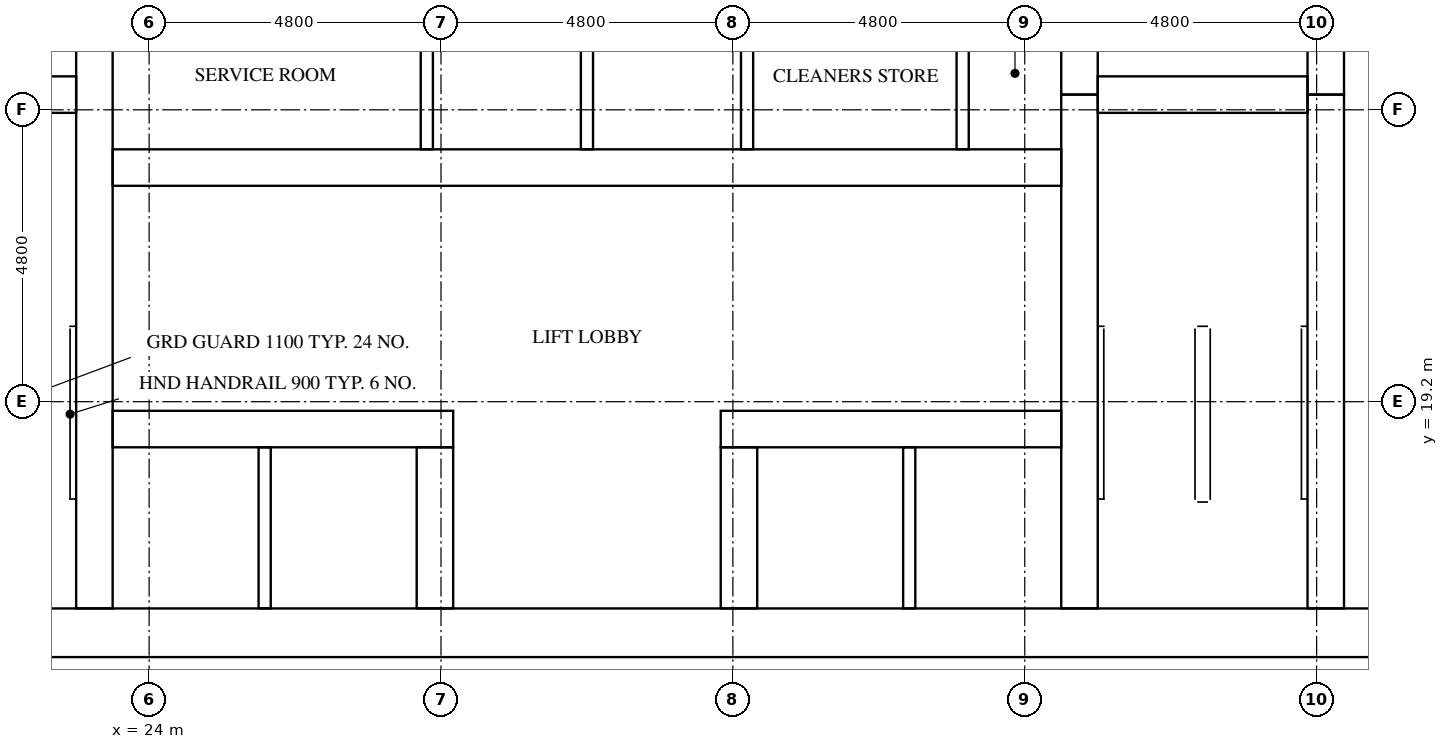
"""IFC4 building model, lengths in metres.
Left out: names, types, materials, properties, quantities, classifications, styles, units other than length and angle.
Written with IfcOpenShell. Run it as: python <this file> out.ifc"""

import sys

from ifc_helpers import new_model, si_unit, direction, frame, frame_2d, origin, place, context, subcontext, project, spatial, rectangle, extrude, element, fill, save


model = new_model("IFC4")
c1 = context("Model", 3, precision=1e-05, world=origin(), true_north=direction((0.0, 1.0)))
c2 = subcontext(c1, "Body", "Model", "MODEL_VIEW")
j1 = project(units=[si_unit("LENGTHUNIT", "METRE"), si_unit("PLANEANGLEUNIT", "RADIAN")], contexts=[c1])
p1 = place(None, origin())
s1 = spatial("IfcSite", under=j1, at=p1, CompositionType="ELEMENT")
p2 = place(p1, origin())
s2 = spatial("IfcBuilding", under=s1, at=p2, CompositionType="ELEMENT")
p3 = place(p2, frame((0.0, 0.0, 136.6)))
s3 = spatial("IfcBuildingStorey", under=s2, at=p3, CompositionType="ELEMENT", Elevation=136.6)
p4 = place(p3, frame((15.0, 15.4, 0.0), z_axis=(0.0, 0.0, 1.0), x_axis=(1.0, 0.0, 0.0)))
e1 = element("IfcWall", 1, at=p4, inside=s3, PredefinedType="SHEAR", context=c2, shape_type="SweptSolid", body=[
    extrude(rectangle(XDim=32.4, YDim=0.8, at=frame_2d((16.2, 0.0))), origin(), (0.0, 0.0, 1.0), 3.2),
])
p5 = place(p4, frame((15.3, 0.0, 0.0)))
e2 = element("IfcOpeningElement", 2, at=p5, cuts=e1, PredefinedType="OPENING", context=c2, shape_type="SweptSolid", body=[
    extrude(rectangle(XDim=1.8, YDim=2.1, at=frame_2d((0.9, 1.05))), frame((0.0, 0.41, 0.0), z_axis=(0.0, -1.0, 0.0), x_axis=(1.0, 0.0, 0.0)), (0.0, 0.0, 1.0), 0.82),
])
p6 = place(p3, frame((23.1, 15.8, 0.0), z_axis=(0.0, 0.0, 1.0), x_axis=(0.0, 1.0, 0.0)))
e3 = element("IfcWall", 3, at=p6, inside=s3, PredefinedType="SHEAR", context=c2, shape_type="SweptSolid", body=[
    extrude(rectangle(XDim=21.2, YDim=0.6, at=frame_2d((10.6, 0.0))), origin(), (0.0, 0.0, 1.0), 3.2),
])
p7 = place(p3, frame((39.3, 15.8, 0.0), z_axis=(0.0, 0.0, 1.0), x_axis=(0.0, 1.0, 0.0)))
e4 = element("IfcWall", 4, at=p7, inside=s3, PredefinedType="SHEAR", context=c2, shape_type="SweptSolid", body=[
    extrude(rectangle(XDim=8.45, YDim=0.6, at=frame_2d((4.225, 0.0))), origin(), (0.0, 0.0, 1.0), 3.2),
])
p8 = place(p3, frame((39.3, 24.25, 0.0), z_axis=(0.0, 0.0, 1.0), x_axis=(0.0, 1.0, 0.0)))
e5 = element("IfcWall", 5, at=p8, inside=s3, PredefinedType="SHEAR", context=c2, shape_type="SweptSolid", body=[
    extrude(rectangle(XDim=3.5, YDim=0.6, at=frame_2d((1.75, 0.0))), origin(), (0.0, 0.0, 1.0), 3.2),
])
p9 = place(p3, frame((43.35, 15.8, 0.0), z_axis=(0.0, 0.0, 1.0), x_axis=(0.0, 1.0, 0.0)))
e6 = element("IfcWall", 6, at=p9, inside=s3, PredefinedType="SHEAR", context=c2, shape_type="SweptSolid", body=[
    extrude(rectangle(XDim=8.45, YDim=0.6, at=frame_2d((4.225, 0.0))), origin(), (0.0, 0.0, 1.0), 3.2),
])
p10 = place(p9, frame((0.4, 0.0, 0.0)))
e7 = element("IfcOpeningElement", 7, at=p10, cuts=e6, PredefinedType="OPENING", context=c2, shape_type="SweptSolid", body=[
    extrude(rectangle(XDim=1.2, YDim=2.1, at=frame_2d((0.6, 1.05))), frame((0.0, 0.31, 0.0), z_axis=(0.0, -1.0, 0.0), x_axis=(1.0, 0.0, 0.0)), (0.0, 0.0, 1.0), 0.62),
])
p11 = place(p3, frame((43.35, 24.25, 0.0), z_axis=(0.0, 0.0, 1.0), x_axis=(0.0, 1.0, 0.0)))
e8 = element("IfcWall", 8, at=p11, inside=s3, PredefinedType="SHEAR", context=c2, shape_type="SweptSolid", body=[
    extrude(rectangle(XDim=3.5, YDim=0.6, at=frame_2d((1.75, 0.0))), origin(), (0.0, 0.0, 1.0), 3.2),
])
p12 = place(p11, frame((1.2, 0.0, 0.0)))
e9 = element("IfcOpeningElement", 9, at=p12, cuts=e8, PredefinedType="OPENING", context=c2, shape_type="SweptSolid", body=[
    extrude(rectangle(XDim=1.1, YDim=2.1, at=frame_2d((0.55, 1.05))), frame((0.0, 0.31, 0.0), z_axis=(0.0, -1.0, 0.0), x_axis=(1.0, 0.0, 0.0)), (0.0, 0.0, 1.0), 0.62),
])
for number, where, z_axis, x_axis in (
    (10, (19.35, 24.25, 0.0), (0.0, 0.0, 1.0), (1.0, 0.0, 0.0)),
    (11, (39.6, 24.25, 0.0), (0.0, 0.0, 1.0), (1.0, 0.0, 0.0)),
):
    element("IfcWall", number, at=place(p3, frame(where, z_axis=z_axis, x_axis=x_axis)), inside=s3, PredefinedType="SHEAR", context=c2, shape_type="SweptSolid", body=[
        extrude(rectangle(XDim=3.45, YDim=0.6, at=frame_2d((1.725, 0.0))), origin(), (0.0, 0.0, 1.0), 3.2),
    ])
p13 = place(p3, frame((23.4, 18.75, 0.0), z_axis=(0.0, 0.0, 1.0), x_axis=(1.0, 0.0, 0.0)))
e12 = element("IfcWall", 12, at=p13, inside=s3, PredefinedType="SHEAR", context=c2, shape_type="SweptSolid", body=[
    extrude(rectangle(XDim=5.6, YDim=0.6, at=frame_2d((2.8, 0.0))), origin(), (0.0, 0.0, 1.0), 3.2),
])
p14 = place(p13, frame((0.65, 0.0, 0.0)))
e13 = element("IfcOpeningElement", 13, at=p14, cuts=e12, PredefinedType="OPENING", context=c2, shape_type="SweptSolid", body=[
    extrude(rectangle(XDim=1.1, YDim=2.1, at=frame_2d((0.55, 1.05))), frame((0.0, 0.31, 0.0), z_axis=(0.0, -1.0, 0.0), x_axis=(1.0, 0.0, 0.0)), (0.0, 0.0, 1.0), 0.62),
])
p15 = place(p13, frame((3.25, 0.0, 0.0)))
e14 = element("IfcOpeningElement", 14, at=p15, cuts=e12, PredefinedType="OPENING", context=c2, shape_type="SweptSolid", body=[
    extrude(rectangle(XDim=1.1, YDim=2.1, at=frame_2d((0.55, 1.05))), frame((0.0, 0.31, 0.0), z_axis=(0.0, -1.0, 0.0), x_axis=(1.0, 0.0, 0.0)), (0.0, 0.0, 1.0), 0.62),
])
p16 = place(p3, frame((33.4, 18.75, 0.0), z_axis=(0.0, 0.0, 1.0), x_axis=(1.0, 0.0, 0.0)))
e15 = element("IfcWall", 15, at=p16, inside=s3, PredefinedType="SHEAR", context=c2, shape_type="SweptSolid", body=[
    extrude(rectangle(XDim=5.6, YDim=0.6, at=frame_2d((2.8, 0.0))), origin(), (0.0, 0.0, 1.0), 3.2),
])
p17 = place(p16, frame((1.25, 0.0, 0.0)))
e16 = element("IfcOpeningElement", 16, at=p17, cuts=e15, PredefinedType="OPENING", context=c2, shape_type="SweptSolid", body=[
    extrude(rectangle(XDim=1.1, YDim=2.1, at=frame_2d((0.55, 1.05))), frame((0.0, 0.31, 0.0), z_axis=(0.0, -1.0, 0.0), x_axis=(1.0, 0.0, 0.0)), (0.0, 0.0, 1.0), 0.62),
])
p18 = place(p16, frame((3.85, 0.0, 0.0)))
e17 = element("IfcOpeningElement", 17, at=p18, cuts=e15, PredefinedType="OPENING", context=c2, shape_type="SweptSolid", body=[
    extrude(rectangle(XDim=1.1, YDim=2.1, at=frame_2d((0.55, 1.05))), frame((0.0, 0.31, 0.0), z_axis=(0.0, -1.0, 0.0), x_axis=(1.0, 0.0, 0.0)), (0.0, 0.0, 1.0), 0.62),
])
p19 = place(p3, frame((23.4, 23.05, 0.0), z_axis=(0.0, 0.0, 1.0), x_axis=(1.0, 0.0, 0.0)))
e18 = element("IfcWall", 18, at=p19, inside=s3, PredefinedType="SHEAR", context=c2, shape_type="SweptSolid", body=[
    extrude(rectangle(XDim=15.6, YDim=0.6, at=frame_2d((7.8, 0.0))), origin(), (0.0, 0.0, 1.0), 3.2),
])
p20 = place(p19, frame((2.033, 0.0, 0.0)))
e19 = element("IfcOpeningElement", 19, at=p20, cuts=e18, PredefinedType="OPENING", context=c2, shape_type="SweptSolid", body=[
    extrude(rectangle(XDim=1.0, YDim=2.1, at=frame_2d((0.5, 1.05))), frame((0.0, 0.31, 0.0), z_axis=(0.0, -1.0, 0.0), x_axis=(1.0, 0.0, 0.0)), (0.0, 0.0, 1.0), 0.62),
])
p21 = place(p19, frame((11.706, 0.0, 0.0)))
e20 = element("IfcOpeningElement", 20, at=p21, cuts=e18, PredefinedType="OPENING", context=c2, shape_type="SweptSolid", body=[
    extrude(rectangle(XDim=1.0, YDim=2.1, at=frame_2d((0.5, 1.05))), frame((0.0, 0.31, 0.0), z_axis=(0.0, -1.0, 0.0), x_axis=(1.0, 0.0, 0.0)), (0.0, 0.0, 1.0), 0.62),
])
p22 = place(p19, frame((14.339, 0.0, 0.0)))
e21 = element("IfcOpeningElement", 21, at=p22, cuts=e18, PredefinedType="OPENING", context=c2, shape_type="SweptSolid", body=[
    extrude(rectangle(XDim=1.0, YDim=2.1, at=frame_2d((0.5, 1.05))), frame((0.0, 0.31, 0.0), z_axis=(0.0, -1.0, 0.0), x_axis=(1.0, 0.0, 0.0)), (0.0, 0.0, 1.0), 0.62),
])
for number, where, z_axis, x_axis in (
    (22, (28.7, 15.8, 0.0), (0.0, 0.0, 1.0), (0.0, 1.0, 0.0)),
    (23, (33.7, 15.8, 0.0), (0.0, 0.0, 1.0), (0.0, 1.0, 0.0)),
):
    element("IfcWall", number, at=place(p3, frame(where, z_axis=z_axis, x_axis=x_axis)), inside=s3, PredefinedType="SHEAR", context=c2, shape_type="SweptSolid", body=[
        extrude(rectangle(XDim=2.65, YDim=0.6, at=frame_2d((1.325, 0.0))), origin(), (0.0, 0.0, 1.0), 3.2),
    ])
for number, where, z_axis, x_axis in (
    (24, (28.567, 23.35, 0.0), (0.0, 0.0, 1.0), (0.0, 1.0, 0.0)),
    (25, (31.2, 23.35, 0.0), (0.0, 0.0, 1.0), (0.0, 1.0, 0.0)),
    (26, (33.833, 23.35, 0.0), (0.0, 0.0, 1.0), (0.0, 1.0, 0.0)),
):
    element("IfcWall", number, at=place(p3, frame(where, z_axis=z_axis, x_axis=x_axis)), inside=s3, PredefinedType="SOLIDWALL", context=c2, shape_type="SweptSolid", body=[
        extrude(rectangle(XDim=2.5, YDim=0.2, at=frame_2d((1.25, 0.0))), origin(), (0.0, 0.0, 1.0), 3.2),
    ])
for number, where, z_axis, x_axis in (
    (27, (25.9, 15.8, 0.0), (0.0, 0.0, 1.0), (0.0, 1.0, 0.0)),
    (28, (36.5, 15.8, 0.0), (0.0, 0.0, 1.0), (0.0, 1.0, 0.0)),
):
    element("IfcWall", number, at=place(p3, frame(where, z_axis=z_axis, x_axis=x_axis)), inside=s3, PredefinedType="SOLIDWALL", context=c2, shape_type="SweptSolid", body=[
        extrude(rectangle(XDim=2.65, YDim=0.2, at=frame_2d((1.325, 0.0))), origin(), (0.0, 0.0, 1.0), 3.2),
    ])
p23 = place(p3, frame((37.379, 23.35, 0.0), z_axis=(0.0, 0.0, 1.0), x_axis=(0.0, 1.0, 0.0)))
e29 = element("IfcWall", 29, at=p23, inside=s3, PredefinedType="PARTITIONING", context=c2, shape_type="SweptSolid", body=[
    extrude(rectangle(XDim=2.5, YDim=0.2, at=frame_2d((1.25, 0.0))), origin(), (0.0, 0.0, 1.0), 3.2),
])
p24 = place(p14, origin())
e30 = element("IfcDoor", 30, at=p24, inside=s3, OperationType="DOUBLE_DOOR_SLIDING", PredefinedType="DOOR", context=c2, shape_type="SweptSolid", body=[
    extrude(rectangle(XDim=1.1, YDim=2.1, at=frame_2d((0.55, 1.05))), frame((0.0, 0.025, 0.0), z_axis=(0.0, -1.0, 0.0), x_axis=(1.0, 0.0, 0.0)), (0.0, 0.0, 1.0), 0.05),
])
fill(e13, e30)
p25 = place(p15, origin())
e31 = element("IfcDoor", 31, at=p25, inside=s3, OperationType="DOUBLE_DOOR_SLIDING", PredefinedType="DOOR", context=c2, shape_type="SweptSolid", body=[
    extrude(rectangle(XDim=1.1, YDim=2.1, at=frame_2d((0.55, 1.05))), frame((0.0, 0.025, 0.0), z_axis=(0.0, -1.0, 0.0), x_axis=(1.0, 0.0, 0.0)), (0.0, 0.0, 1.0), 0.05),
])
fill(e14, e31)
p26 = place(p17, origin())
e32 = element("IfcDoor", 32, at=p26, inside=s3, OperationType="DOUBLE_DOOR_SLIDING", PredefinedType="DOOR", context=c2, shape_type="SweptSolid", body=[
    extrude(rectangle(XDim=1.1, YDim=2.1, at=frame_2d((0.55, 1.05))), frame((0.0, 0.025, 0.0), z_axis=(0.0, -1.0, 0.0), x_axis=(1.0, 0.0, 0.0)), (0.0, 0.0, 1.0), 0.05),
])
fill(e16, e32)
p27 = place(p18, origin())
e33 = element("IfcDoor", 33, at=p27, inside=s3, OperationType="DOUBLE_DOOR_SLIDING", PredefinedType="DOOR", context=c2, shape_type="SweptSolid", body=[
    extrude(rectangle(XDim=1.1, YDim=2.1, at=frame_2d((0.55, 1.05))), frame((0.0, 0.025, 0.0), z_axis=(0.0, -1.0, 0.0), x_axis=(1.0, 0.0, 0.0)), (0.0, 0.0, 1.0), 0.05),
])
fill(e17, e33)
p28 = place(p10, origin())
e34 = element("IfcDoor", 34, at=p28, inside=s3, OperationType="SINGLE_SWING_RIGHT", PredefinedType="DOOR", context=c2, shape_type="SweptSolid", body=[
    extrude(rectangle(XDim=1.2, YDim=2.1, at=frame_2d((0.6, 1.05))), frame((0.0, 0.025, 0.0), z_axis=(0.0, -1.0, 0.0), x_axis=(1.0, 0.0, 0.0)), (0.0, 0.0, 1.0), 0.05),
])
fill(e7, e34)
p29 = place(p5, frame((1.8, 0.0, 0.0), z_axis=(0.0, 0.0, 1.0), x_axis=(-1.0, 0.0, 0.0)))
e35 = element("IfcDoor", 35, at=p29, inside=s3, OperationType="DOUBLE_DOOR_SINGLE_SWING", PredefinedType="DOOR", context=c2, shape_type="SweptSolid", body=[
    extrude(rectangle(XDim=1.8, YDim=2.1, at=frame_2d((0.9, 1.05))), frame((0.0, 0.025, 0.0), z_axis=(0.0, -1.0, 0.0), x_axis=(1.0, 0.0, 0.0)), (0.0, 0.0, 1.0), 0.05),
])
fill(e2, e35)
p30 = place(p20, frame((1.0, 0.0, 0.0), z_axis=(0.0, 0.0, 1.0), x_axis=(-1.0, 0.0, 0.0)))
e36 = element("IfcDoor", 36, at=p30, inside=s3, OperationType="SINGLE_SWING_RIGHT", PredefinedType="DOOR", context=c2, shape_type="SweptSolid", body=[
    extrude(rectangle(XDim=1.0, YDim=2.1, at=frame_2d((0.5, 1.05))), frame((0.0, 0.025, 0.0), z_axis=(0.0, -1.0, 0.0), x_axis=(1.0, 0.0, 0.0)), (0.0, 0.0, 1.0), 0.05),
])
fill(e19, e36)
p31 = place(p21, frame((1.0, 0.0, 0.0), z_axis=(0.0, 0.0, 1.0), x_axis=(-1.0, 0.0, 0.0)))
e37 = element("IfcDoor", 37, at=p31, inside=s3, OperationType="SINGLE_SWING_LEFT", PredefinedType="DOOR", context=c2, shape_type="SweptSolid", body=[
    extrude(rectangle(XDim=1.0, YDim=2.1, at=frame_2d((0.5, 1.05))), frame((0.0, 0.025, 0.0), z_axis=(0.0, -1.0, 0.0), x_axis=(1.0, 0.0, 0.0)), (0.0, 0.0, 1.0), 0.05),
])
fill(e20, e37)
p32 = place(p22, frame((1.0, 0.0, 0.0), z_axis=(0.0, 0.0, 1.0), x_axis=(-1.0, 0.0, 0.0)))
e38 = element("IfcDoor", 38, at=p32, inside=s3, OperationType="SINGLE_SWING_RIGHT", PredefinedType="DOOR", context=c2, shape_type="SweptSolid", body=[
    extrude(rectangle(XDim=1.0, YDim=2.1, at=frame_2d((0.5, 1.05))), frame((0.0, 0.025, 0.0), z_axis=(0.0, -1.0, 0.0), x_axis=(1.0, 0.0, 0.0)), (0.0, 0.0, 1.0), 0.05),
])
fill(e21, e38)
save(model, sys.argv[1])
